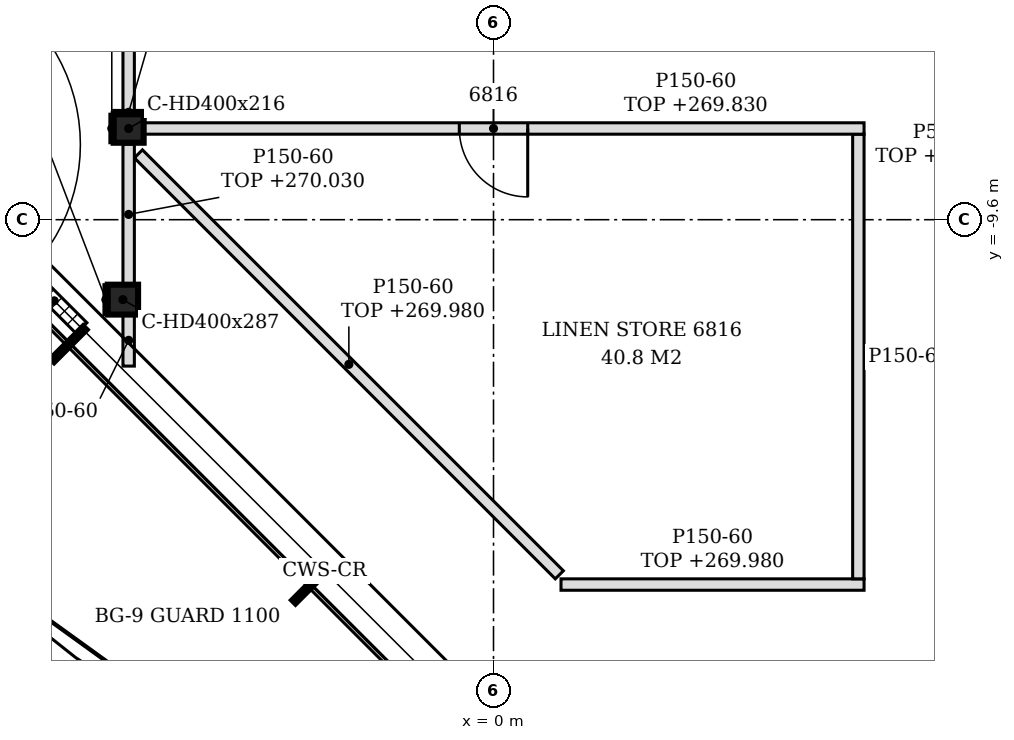
"""IFC4 building model, lengths in metres.
Left out: names, types, materials, properties, quantities, classifications, styles, units other than length and angle.
Written with IfcOpenShell. Run it as: python <this file> out.ifc"""

import sys

from ifc_helpers import new_model, si_unit, direction, frame, frame_2d, origin, origin_2d, place, context, subcontext, project, spatial, polyline, rectangle, i_section, outline, extrude, element, fill, save


model = new_model("IFC4")
c1 = context("Model", 3, precision=1e-05, world=origin(), true_north=direction((0.0, 1.0)))
c2 = subcontext(c1, "Body", "Model", "MODEL_VIEW")
j1 = project(units=[si_unit("LENGTHUNIT", "METRE"), si_unit("PLANEANGLEUNIT", "RADIAN")], contexts=[c1])
p1 = place(None, origin())
s1 = spatial("IfcSite", under=j1, at=p1, CompositionType="ELEMENT")
p2 = place(p1, origin())
s2 = spatial("IfcBuilding", under=s1, at=p2, CompositionType="ELEMENT")
p3 = place(p2, frame((0.0, 0.0, 267.0)))
s3 = spatial("IfcBuildingStorey", under=s2, at=p3, CompositionType="ELEMENT", Elevation=267.0)
p4 = place(p3, frame((-4.876, -10.652, -0.15), z_axis=(0.0, 0.0, 1.0), x_axis=(1.0, 0.0, 0.0)))
e1 = element("IfcColumn", 1, at=p4, inside=s3, PredefinedType="COLUMN", context=c2, shape_type="SweptSolid", body=[
    extrude(i_section(OverallWidth=0.399, OverallDepth=0.393, WebThickness=0.023, FlangeThickness=0.037, FilletRadius=0.015, at=origin_2d()), origin(), (0.0, 0.0, 1.0), 3.6),
])
p5 = place(p3, frame((-4.8, -8.4, -0.15), z_axis=(0.0, 0.0, 1.0), x_axis=(1.0, 0.0, 0.0)))
e2 = element("IfcColumn", 2, at=p5, inside=s3, PredefinedType="COLUMN", context=c2, shape_type="SweptSolid", body=[
    extrude(i_section(OverallWidth=0.394, OverallDepth=0.375, WebThickness=0.017, FlangeThickness=0.028, FilletRadius=0.015, at=origin_2d()), origin(), (0.0, 0.0, 1.0), 3.6),
])
p6 = place(p3, frame((-8.553, -7.893, 0.0), z_axis=(0.0, 0.0, 1.0), x_axis=(0.707134329907, -0.707079231393, 0.0)))
e3 = element("IfcWall", 3, at=p6, inside=s3, PredefinedType="NOTDEFINED", context=c2, shape_type="SweptSolid", body=[
    extrude(rectangle(XDim=4.431, YDim=0.2, at=frame_2d((2.215, 0.0))), origin(), (0.0, 0.0, 1.0), 3.45),
])
p7 = place(p6, frame((1.015, 0.0, 0.0)))
e4 = element("IfcOpeningElement", 4, at=p7, cuts=e3, PredefinedType="OPENING", context=c2, shape_type="SweptSolid", body=[
    extrude(rectangle(XDim=2.4, YDim=2.4, at=frame_2d((1.2, 1.2))), frame((0.0, 0.11, 0.0), z_axis=(0.0, -1.0, 0.0), x_axis=(1.0, 0.0, 0.0)), (0.0, 0.0, 1.0), 0.22),
])
p8 = place(p3, frame((0.888, -14.4, 0.0), z_axis=(0.0, 0.0, 1.0), x_axis=(1.0, 0.0, 0.0)))
e5 = element("IfcWall", 5, at=p8, inside=s3, PredefinedType="PARTITIONING", context=c2, shape_type="SweptSolid", body=[
    extrude(rectangle(XDim=3.987, YDim=0.15, at=frame_2d((1.994, 0.0))), origin(), (0.0, 0.0, 1.0), 2.98),
])
p9 = place(p3, frame((0.866, -14.272, 0.0), z_axis=(0.0, 0.0, 1.0), x_axis=(-0.707106781187, 0.707106781187, 0.0)))
e6 = element("IfcWall", 6, at=p9, inside=s3, PredefinedType="PARTITIONING", context=c2, shape_type="SweptSolid", body=[
    extrude(rectangle(XDim=7.832, YDim=0.15, at=frame_2d((3.916, 0.0))), origin(), (0.0, 0.0, 1.0), 2.98),
])
p10 = place(p3, frame((4.8, -14.325, 0.0), z_axis=(0.0, 0.0, 1.0), x_axis=(0.0, 1.0, 0.0)))
e7 = element("IfcWall", 7, at=p10, inside=s3, PredefinedType="PARTITIONING", context=c2, shape_type="SweptSolid", body=[
    extrude(outline(polyline([(0.0, 0.0), (5.85, 0.0), (5.85, 2.83), (5.775, 2.83), (5.773, 3.45), (0.02, 3.45), (0.018, 2.98), (0.0, 2.98), (0.0, 0.0)])), frame((0.0, 0.075, 0.0), z_axis=(0.0, -1.0, 0.0), x_axis=(1.0, 0.0, 0.0)), (0.0, 0.0, 1.0), 0.15),
])
p11 = place(p3, frame((-4.8, -11.526, 0.0), z_axis=(0.0, 0.0, 1.0), x_axis=(0.0, 1.0, 0.0)))
e8 = element("IfcWall", 8, at=p11, inside=s3, PredefinedType="PARTITIONING", context=c2, shape_type="SweptSolid", body=[
    extrude(outline(polyline([(0.0, 0.0), (0.678, 0.0), (0.678, 2.63), (0.229, 2.63), (0.227, 3.45), (0.0, 3.45), (0.0, 0.0)])), frame((0.0, 0.075, 0.0), z_axis=(0.0, -1.0, 0.0), x_axis=(1.0, 0.0, 0.0)), (0.0, 0.0, 1.0), 0.15),
])
p12 = place(p3, frame((-4.8, -10.455, 0.0), z_axis=(0.0, 0.0, 1.0), x_axis=(0.0, 1.0, 0.0)))
e9 = element("IfcWall", 9, at=p12, inside=s3, PredefinedType="PARTITIONING", context=c2, shape_type="SweptSolid", body=[
    extrude(outline(polyline([(0.0, 0.0), (1.849, 0.0), (1.849, 3.03), (0.298, 3.03), (0.296, 2.63), (0.058, 2.63), (0.056, 3.03), (0.0, 3.03), (0.0, 0.0)])), frame((0.0, 0.075, 0.0), z_axis=(0.0, -1.0, 0.0), x_axis=(1.0, 0.0, 0.0)), (0.0, 0.0, 1.0), 0.15),
])
p13 = place(p3, frame((-4.603, -8.4, 0.0), z_axis=(0.0, 0.0, 1.0), x_axis=(1.0, 0.0, 0.0)))
e10 = element("IfcWall", 10, at=p13, inside=s3, PredefinedType="PARTITIONING", context=c2, shape_type="SweptSolid", body=[
    extrude(rectangle(XDim=9.478, YDim=0.15, at=frame_2d((4.739, 0.0))), origin(), (0.0, 0.0, 1.0), 2.83),
])
p14 = place(p13, frame((4.153, 0.0, 0.0)))
e11 = element("IfcOpeningElement", 11, at=p14, cuts=e10, PredefinedType="OPENING", context=c2, shape_type="SweptSolid", body=[
    extrude(rectangle(XDim=0.9, YDim=2.1, at=frame_2d((0.45, 1.05))), frame((0.0, 0.085, 0.0), z_axis=(0.0, -1.0, 0.0), x_axis=(1.0, 0.0, 0.0)), (0.0, 0.0, 1.0), 0.17),
])
p15 = place(p3, frame((-4.8, -8.212, 0.0), z_axis=(0.0, 0.0, 1.0), x_axis=(0.0, 1.0, 0.0)))
e12 = element("IfcWall", 12, at=p15, inside=s3, PredefinedType="PARTITIONING", context=c2, shape_type="SweptSolid", body=[
    extrude(rectangle(XDim=10.425, YDim=0.15, at=frame_2d((5.212, 0.0))), origin(), (0.0, 0.0, 1.0), 2.83),
])
p16 = place(p15, frame((9.062, 0.0, 0.0)))
e13 = element("IfcOpeningElement", 13, at=p16, cuts=e12, PredefinedType="OPENING", context=c2, shape_type="SweptSolid", body=[
    extrude(rectangle(XDim=0.9, YDim=2.1, at=frame_2d((0.45, 1.05))), frame((0.0, 0.085, 0.0), z_axis=(0.0, -1.0, 0.0), x_axis=(1.0, 0.0, 0.0)), (0.0, 0.0, 1.0), 0.17),
])
p17 = place(p3, frame((-5.1, -10.848, 0.0), z_axis=(0.0, 0.0, 1.0), x_axis=(0.0, 1.0, 0.0)))
e14 = element("IfcWall", 14, at=p17, inside=s3, PredefinedType="PARTITIONING", context=c2, shape_type="SweptSolid", body=[
    extrude(rectangle(XDim=0.393, YDim=0.05, at=frame_2d((0.196, 0.0))), origin(), (0.0, 0.0, 1.0), 2.63),
])
p18 = place(p3, frame((-5.022, -8.587, 0.0), z_axis=(0.0, 0.0, 1.0), x_axis=(0.0, 1.0, 0.0)))
e15 = element("IfcWall", 15, at=p18, inside=s3, PredefinedType="PARTITIONING", context=c2, shape_type="SweptSolid", body=[
    extrude(rectangle(XDim=0.375, YDim=0.05, at=frame_2d((0.188, 0.0))), origin(), (0.0, 0.0, 1.0), 3.45),
])
p19 = place(p3, frame((-4.997, -8.188, 0.0), z_axis=(0.0, 0.0, 1.0), x_axis=(1.0, 0.0, 0.0)))
e16 = element("IfcWall", 16, at=p19, inside=s3, PredefinedType="PARTITIONING", context=c2, shape_type="SweptSolid", body=[
    extrude(rectangle(XDim=0.394, YDim=0.05, at=frame_2d((0.197, 0.0))), origin(), (0.0, 0.0, 1.0), 2.83),
])
p20 = place(p14, frame((0.9, 0.0, 0.0), z_axis=(0.0, 0.0, 1.0), x_axis=(-1.0, 0.0, 0.0)))
e17 = element("IfcDoor", 17, at=p20, inside=s3, OperationType="SINGLE_SWING_LEFT", PredefinedType="DOOR", context=c2, shape_type="SweptSolid", body=[
    extrude(rectangle(XDim=0.9, YDim=2.1, at=frame_2d((0.45, 1.05))), frame((0.0, 0.025, 0.0), z_axis=(0.0, -1.0, 0.0), x_axis=(1.0, 0.0, 0.0)), (0.0, 0.0, 1.0), 0.05),
])
fill(e11, e17)
save(model, sys.argv[1])
